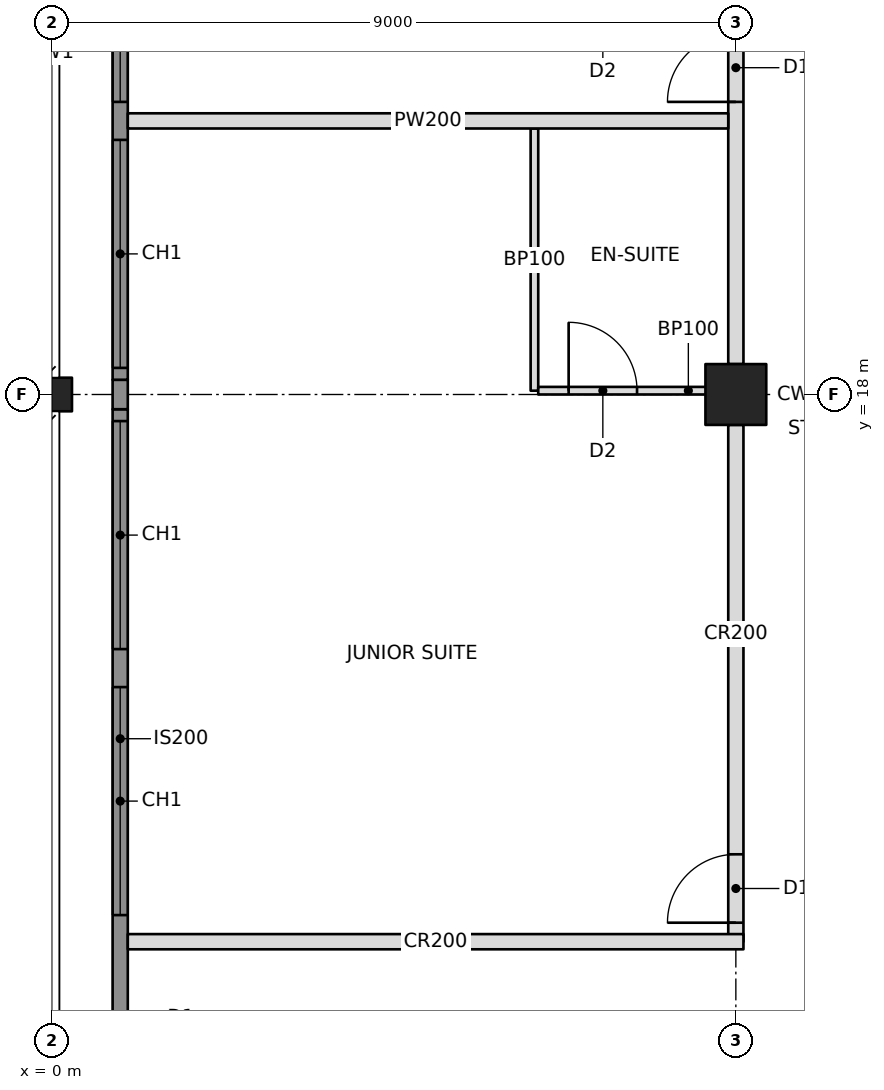
"""IFC4 building model, lengths in metres.
Left out: names, types, materials, properties, quantities, classifications, styles, units other than length and angle.
Written with IfcOpenShell. Run it as: python <this file> out.ifc"""

import sys

from ifc_helpers import new_model, si_unit, direction, frame, frame_2d, origin, origin_2d, place, context, subcontext, project, spatial, rectangle, hollow_rectangle, i_section, extrude, element, fill, save


model = new_model("IFC4")
c1 = context("Model", 3, precision=1e-05, world=origin(), true_north=direction((0.0, 1.0)))
c2 = subcontext(c1, "Body", "Model", "MODEL_VIEW")
j1 = project(units=[si_unit("LENGTHUNIT", "METRE"), si_unit("PLANEANGLEUNIT", "RADIAN")], contexts=[c1])
p1 = place(None, origin())
s1 = spatial("IfcSite", under=j1, at=p1, CompositionType="ELEMENT")
p2 = place(p1, origin())
s2 = spatial("IfcBuilding", under=s1, at=p2, CompositionType="ELEMENT")
p3 = place(p2, frame((0.0, 0.0, 124.8)))
s3 = spatial("IfcBuildingStorey", under=s2, at=p3, CompositionType="ELEMENT", Elevation=124.8)
p4 = place(p3, frame((0.0, 18.0, 0.0), z_axis=(0.0, 0.0, 1.0), x_axis=(0.0, 1.0, 0.0)))
e1 = element("IfcColumn", 1, at=p4, inside=s3, PredefinedType="COLUMN", context=c2, shape_type="SweptSolid", body=[
    extrude(i_section(OverallWidth=0.442, OverallDepth=0.531, WebThickness=0.066, FlangeThickness=0.106, at=origin_2d()), origin(), (0.0, 0.0, 1.0), 3.4),
])
p5 = place(p3, frame((9.0, 18.0, 0.0), z_axis=(0.0, 0.0, 1.0), x_axis=(1.0, 0.0, 0.0)))
e2 = element("IfcColumn", 2, at=p5, inside=s3, PredefinedType="COLUMN", context=c2, shape_type="SweptSolid", body=[
    extrude(hollow_rectangle(XDim=0.8, YDim=0.8, WallThickness=0.07, at=origin_2d()), origin(), (0.0, 0.0, 1.0), 3.4),
])
p6 = place(p3, frame((9.0, 10.8, 0.0), z_axis=(0.0, 0.0, 1.0), x_axis=(0.0, 1.0, 0.0)))
e3 = element("IfcWall", 3, at=p6, inside=s3, PredefinedType="PARTITIONING", context=c2, shape_type="SweptSolid", body=[
    extrude(rectangle(XDim=6.8, YDim=0.2, at=frame_2d((3.4, 0.0))), origin(), (0.0, 0.0, 1.0), 2.405),
])
p7 = place(p6, frame((0.25, 0.0, 0.0)))
e4 = element("IfcOpeningElement", 4, at=p7, cuts=e3, PredefinedType="OPENING", context=c2, shape_type="SweptSolid", body=[
    extrude(rectangle(XDim=0.9, YDim=2.1, at=frame_2d((0.45, 1.05))), frame((0.0, 0.11, 0.0), z_axis=(0.0, -1.0, 0.0), x_axis=(1.0, 0.0, 0.0)), (0.0, 0.0, 1.0), 0.22),
])
p8 = place(p3, frame((9.0, 18.4, 0.0), z_axis=(0.0, 0.0, 1.0), x_axis=(0.0, 1.0, 0.0)))
e5 = element("IfcWall", 5, at=p8, inside=s3, PredefinedType="PARTITIONING", context=c2, shape_type="SweptSolid", body=[
    extrude(rectangle(XDim=6.8, YDim=0.2, at=frame_2d((3.4, 0.0))), origin(), (0.0, 0.0, 1.0), 2.405),
])
p9 = place(p8, frame((3.45, 0.0, 0.0)))
e6 = element("IfcOpeningElement", 6, at=p9, cuts=e5, PredefinedType="OPENING", context=c2, shape_type="SweptSolid", body=[
    extrude(rectangle(XDim=0.9, YDim=2.1, at=frame_2d((0.45, 1.05))), frame((0.0, 0.11, 0.0), z_axis=(0.0, -1.0, 0.0), x_axis=(1.0, 0.0, 0.0)), (0.0, 0.0, 1.0), 0.22),
])
p10 = place(p3, frame((1.0, 10.8, 0.0), z_axis=(0.0, 0.0, 1.0), x_axis=(1.0, 0.0, 0.0)))
e7 = element("IfcWall", 7, at=p10, inside=s3, PredefinedType="PARTITIONING", context=c2, shape_type="SweptSolid", body=[
    extrude(rectangle(XDim=8.1, YDim=0.2, at=frame_2d((4.05, 0.0))), origin(), (0.0, 0.0, 1.0), 2.404),
])
p11 = place(p3, frame((8.9, 21.6, 0.0), z_axis=(0.0, 0.0, 1.0), x_axis=(-1.0, 0.0, 0.0)))
e8 = element("IfcWall", 8, at=p11, inside=s3, PredefinedType="PARTITIONING", context=c2, shape_type="SweptSolid", body=[
    extrude(rectangle(XDim=7.9, YDim=0.2, at=frame_2d((3.95, 0.0))), origin(), (0.0, 0.0, 1.0), 2.404),
])
p12 = place(p3, frame((6.35, 18.05, 0.0), z_axis=(0.0, 0.0, 1.0), x_axis=(0.0, 1.0, 0.0)))
e9 = element("IfcWall", 9, at=p12, inside=s3, PredefinedType="PARTITIONING", context=c2, shape_type="SweptSolid", body=[
    extrude(rectangle(XDim=3.45, YDim=0.1, at=frame_2d((1.725, 0.0))), origin(), (0.0, 0.0, 1.0), 2.404),
])
p13 = place(p3, frame((8.9, 18.05, 0.0), z_axis=(0.0, 0.0, 1.0), x_axis=(-1.0, 0.0, 0.0)))
e10 = element("IfcWall", 10, at=p13, inside=s3, PredefinedType="PARTITIONING", context=c2, shape_type="SweptSolid", body=[
    extrude(rectangle(XDim=2.5, YDim=0.1, at=frame_2d((1.25, 0.0))), origin(), (0.0, 0.0, 1.0), 2.405),
])
p14 = place(p13, frame((1.2, 0.0, 0.0)))
e11 = element("IfcOpeningElement", 11, at=p14, cuts=e10, PredefinedType="OPENING", context=c2, shape_type="SweptSolid", body=[
    extrude(rectangle(XDim=0.9, YDim=2.1, at=frame_2d((0.45, 1.05))), frame((0.0, 0.06, 0.0), z_axis=(0.0, -1.0, 0.0), x_axis=(1.0, 0.0, 0.0)), (0.0, 0.0, 1.0), 0.12),
])
p15 = place(p3, frame((0.9, 9.135, 0.0), z_axis=(0.0, 0.0, 1.0), x_axis=(0.0, 1.0, 0.0)))
e12 = element("IfcWall", 12, at=p15, inside=s3, PredefinedType="SOLIDWALL", context=c2, shape_type="SweptSolid", body=[
    extrude(rectangle(XDim=8.671, YDim=0.2, at=frame_2d((4.335, 0.0))), origin(), (0.0, 0.0, 1.0), 3.2),
])
p16 = place(p15, frame((2.015, 0.0, 0.6)))
e13 = element("IfcOpeningElement", 13, at=p16, cuts=e12, PredefinedType="OPENING", context=c2, shape_type="SweptSolid", body=[
    extrude(rectangle(XDim=3.0, YDim=2.2, at=frame_2d((1.5, 1.1))), frame((0.0, 0.11, 0.0), z_axis=(0.0, -1.0, 0.0), x_axis=(1.0, 0.0, 0.0)), (0.0, 0.0, 1.0), 0.22),
])
p17 = place(p15, frame((5.515, 0.0, 0.6)))
e14 = element("IfcOpeningElement", 14, at=p17, cuts=e12, PredefinedType="OPENING", context=c2, shape_type="SweptSolid", body=[
    extrude(rectangle(XDim=3.0, YDim=2.2, at=frame_2d((1.5, 1.1))), frame((0.0, 0.11, 0.0), z_axis=(0.0, -1.0, 0.0), x_axis=(1.0, 0.0, 0.0)), (0.0, 0.0, 1.0), 0.22),
])
p18 = place(p3, frame((0.9, 17.806, 0.0), z_axis=(0.0, 0.0, 1.0), x_axis=(0.0, 1.0, 0.0)))
e15 = element("IfcWall", 15, at=p18, inside=s3, PredefinedType="SOLIDWALL", context=c2, shape_type="SweptSolid", body=[
    extrude(rectangle(XDim=0.388, YDim=0.2, at=frame_2d((0.194, 0.0))), origin(), (0.0, 0.0, 1.0), 2.404),
])
p19 = place(p3, frame((0.9, 18.194, 0.0), z_axis=(0.0, 0.0, 1.0), x_axis=(0.0, 1.0, 0.0)))
e16 = element("IfcWall", 16, at=p19, inside=s3, PredefinedType="SOLIDWALL", context=c2, shape_type="SweptSolid", body=[
    extrude(rectangle(XDim=8.671, YDim=0.2, at=frame_2d((4.335, 0.0))), origin(), (0.0, 0.0, 1.0), 3.2),
])
p20 = place(p19, frame((0.156, 0.0, 0.6)))
e17 = element("IfcOpeningElement", 17, at=p20, cuts=e16, PredefinedType="OPENING", context=c2, shape_type="SweptSolid", body=[
    extrude(rectangle(XDim=3.0, YDim=2.2, at=frame_2d((1.5, 1.1))), frame((0.0, 0.11, 0.0), z_axis=(0.0, -1.0, 0.0), x_axis=(1.0, 0.0, 0.0)), (0.0, 0.0, 1.0), 0.22),
])
p21 = place(p19, frame((3.656, 0.0, 0.6)))
e18 = element("IfcOpeningElement", 18, at=p21, cuts=e16, PredefinedType="OPENING", context=c2, shape_type="SweptSolid", body=[
    extrude(rectangle(XDim=3.0, YDim=2.2, at=frame_2d((1.5, 1.1))), frame((0.0, 0.11, 0.0), z_axis=(0.0, -1.0, 0.0), x_axis=(1.0, 0.0, 0.0)), (0.0, 0.0, 1.0), 0.22),
])
p22 = place(p16, origin())
e19 = element("IfcWindow", 19, at=p22, inside=s3, PartitioningType="TRIPLE_PANEL_VERTICAL", PredefinedType="WINDOW", context=c2, shape_type="SweptSolid", body=[
    extrude(rectangle(XDim=3.0, YDim=2.2, at=frame_2d((1.5, 1.1))), frame((0.0, 0.03, 0.0), z_axis=(0.0, -1.0, 0.0), x_axis=(1.0, 0.0, 0.0)), (0.0, 0.0, 1.0), 0.06),
])
fill(e13, e19)
p23 = place(p17, origin())
e20 = element("IfcWindow", 20, at=p23, inside=s3, PartitioningType="TRIPLE_PANEL_VERTICAL", PredefinedType="WINDOW", context=c2, shape_type="SweptSolid", body=[
    extrude(rectangle(XDim=3.0, YDim=2.2, at=frame_2d((1.5, 1.1))), frame((0.0, 0.03, 0.0), z_axis=(0.0, -1.0, 0.0), x_axis=(1.0, 0.0, 0.0)), (0.0, 0.0, 1.0), 0.06),
])
fill(e14, e20)
p24 = place(p20, origin())
e21 = element("IfcWindow", 21, at=p24, inside=s3, PartitioningType="TRIPLE_PANEL_VERTICAL", PredefinedType="WINDOW", context=c2, shape_type="SweptSolid", body=[
    extrude(rectangle(XDim=3.0, YDim=2.2, at=frame_2d((1.5, 1.1))), frame((0.0, 0.03, 0.0), z_axis=(0.0, -1.0, 0.0), x_axis=(1.0, 0.0, 0.0)), (0.0, 0.0, 1.0), 0.06),
])
fill(e17, e21)
p25 = place(p21, origin())
e22 = element("IfcWindow", 22, at=p25, inside=s3, PartitioningType="TRIPLE_PANEL_VERTICAL", PredefinedType="WINDOW", context=c2, shape_type="SweptSolid", body=[
    extrude(rectangle(XDim=3.0, YDim=2.2, at=frame_2d((1.5, 1.1))), frame((0.0, 0.03, 0.0), z_axis=(0.0, -1.0, 0.0), x_axis=(1.0, 0.0, 0.0)), (0.0, 0.0, 1.0), 0.06),
])
fill(e18, e22)
p26 = place(p14, frame((0.9, 0.0, 0.0), z_axis=(0.0, 0.0, 1.0), x_axis=(-1.0, 0.0, 0.0)))
e23 = element("IfcDoor", 23, at=p26, inside=s3, OperationType="SINGLE_SWING_LEFT", PredefinedType="DOOR", context=c2, shape_type="SweptSolid", body=[
    extrude(rectangle(XDim=0.9, YDim=2.1, at=frame_2d((0.45, 1.05))), frame((0.0, 0.025, 0.0), z_axis=(0.0, -1.0, 0.0), x_axis=(1.0, 0.0, 0.0)), (0.0, 0.0, 1.0), 0.05),
])
fill(e11, e23)
p27 = place(p7, origin())
e24 = element("IfcDoor", 24, at=p27, inside=s3, OperationType="SINGLE_SWING_LEFT", PredefinedType="DOOR", context=c2, shape_type="SweptSolid", body=[
    extrude(rectangle(XDim=0.9, YDim=2.1, at=frame_2d((0.45, 1.05))), frame((0.0, 0.025, 0.0), z_axis=(0.0, -1.0, 0.0), x_axis=(1.0, 0.0, 0.0)), (0.0, 0.0, 1.0), 0.05),
])
fill(e4, e24)
p28 = place(p9, origin())
e25 = element("IfcDoor", 25, at=p28, inside=s3, OperationType="SINGLE_SWING_LEFT", PredefinedType="DOOR", context=c2, shape_type="SweptSolid", body=[
    extrude(rectangle(XDim=0.9, YDim=2.1, at=frame_2d((0.45, 1.05))), frame((0.0, 0.025, 0.0), z_axis=(0.0, -1.0, 0.0), x_axis=(1.0, 0.0, 0.0)), (0.0, 0.0, 1.0), 0.05),
])
fill(e6, e25)
save(model, sys.argv[1])
